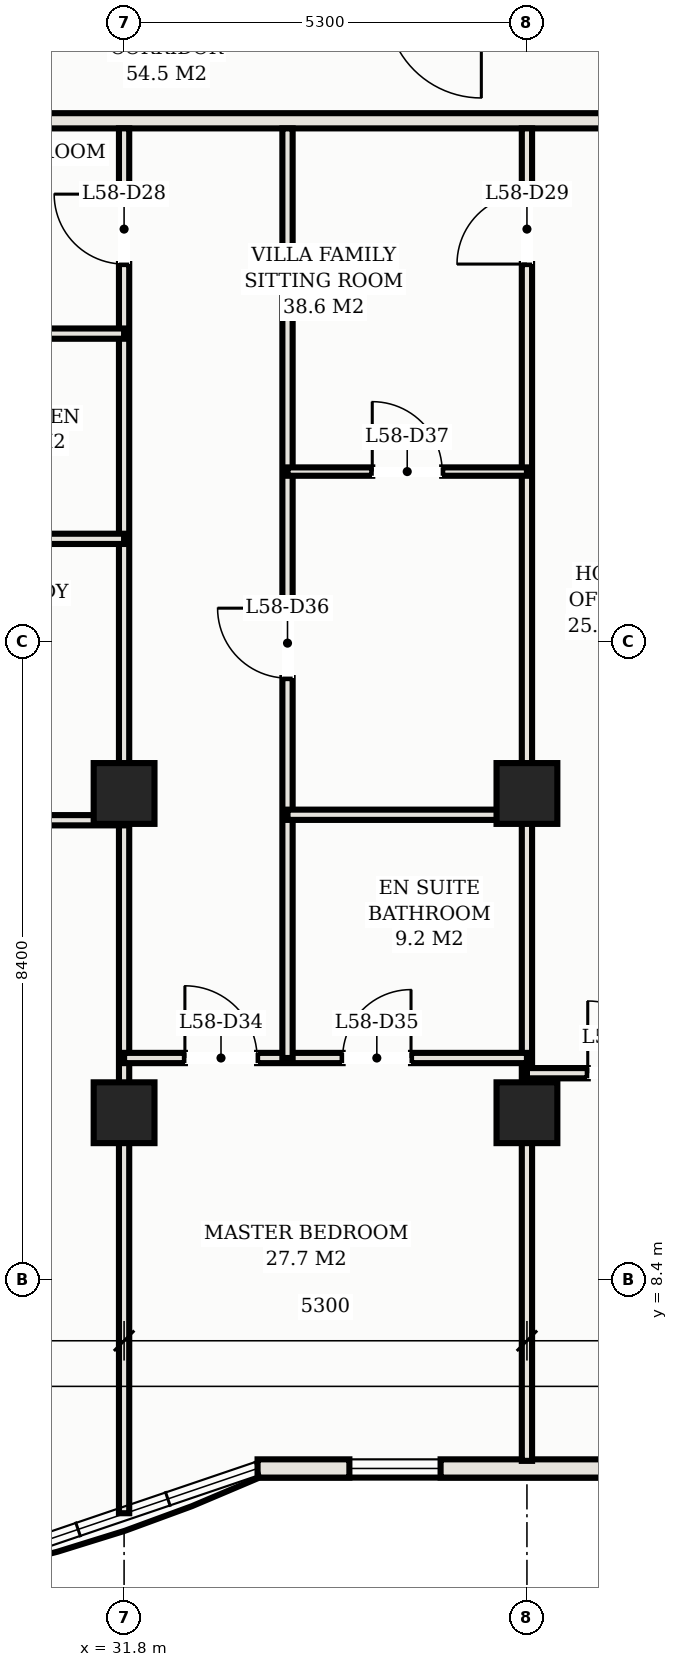
"""IFC4 building model, lengths in metres.
Left out: names, types, materials, properties, quantities, classifications, styles, units other than length and angle.
Written with IfcOpenShell. Run it as: python <this file> out.ifc"""

import sys

from ifc_helpers import new_model, si_unit, direction, frame, frame_2d, origin, origin_2d, place, context, subcontext, project, spatial, rectangle, hollow_rectangle, extrude, element, fill, save


model = new_model("IFC4")
c1 = context("Model", 3, precision=1e-05, world=origin(), true_north=direction((0.0, 1.0)))
c2 = subcontext(c1, "Body", "Model", "MODEL_VIEW")
j1 = project(units=[si_unit("LENGTHUNIT", "METRE"), si_unit("PLANEANGLEUNIT", "RADIAN")], contexts=[c1])
p1 = place(None, origin())
s1 = spatial("IfcSite", under=j1, at=p1, CompositionType="ELEMENT")
p2 = place(p1, origin())
s2 = spatial("IfcBuilding", under=s1, at=p2, CompositionType="ELEMENT")
p3 = place(p2, frame((0.0, 0.0, 213.2)))
s3 = spatial("IfcBuildingStorey", under=s2, at=p3, CompositionType="ELEMENT", Elevation=213.2)
for number, where, z_axis, x_axis in (
    (1, (31.8, 14.8, 0.0), (0.0, 0.0, 1.0), (1.0, 0.0, 0.0)),
    (2, (31.8, 10.6, 0.0), (0.0, 0.0, 1.0), (1.0, 0.0, 0.0)),
    (3, (37.1, 14.8, 0.0), (0.0, 0.0, 1.0), (1.0, 0.0, 0.0)),
    (4, (37.1, 10.6, 0.0), (0.0, 0.0, 1.0), (1.0, 0.0, 0.0)),
):
    element("IfcColumn", number, at=place(p3, frame(where, z_axis=z_axis, x_axis=x_axis)), inside=s3, PredefinedType="COLUMN", context=c2, shape_type="SweptSolid", body=[
        extrude(hollow_rectangle(XDim=0.8, YDim=0.8, WallThickness=0.028, at=origin_2d()), origin(), (0.0, 0.0, 1.0), 3.3),
    ])
p4 = place(p3, frame((33.556, 5.92, 0.0), z_axis=(0.0, 0.0, 1.0), x_axis=(1.0, 0.0, 0.0)))
e5 = element("IfcWall", 5, at=p4, inside=s3, PredefinedType="SOLIDWALL", context=c2, shape_type="SweptSolid", body=[
    extrude(rectangle(XDim=8.124, YDim=0.24, at=frame_2d((4.062, 0.0))), origin(), (0.0, 0.0, 1.0), 3.11),
])
p5 = place(p4, frame((5.348, 0.0, 0.75)))
e6 = element("IfcOpeningElement", 6, at=p5, cuts=e5, PredefinedType="OPENING", context=c2, shape_type="SweptSolid", body=[
    extrude(rectangle(XDim=0.9, YDim=1.2, at=frame_2d((0.45, 0.6))), frame((0.0, 0.13, 0.0), z_axis=(0.0, -1.0, 0.0), x_axis=(1.0, 0.0, 0.0)), (0.0, 0.0, 1.0), 0.26),
])
p6 = place(p4, frame((1.208, 0.0, 0.75)))
e7 = element("IfcOpeningElement", 7, at=p6, cuts=e5, PredefinedType="OPENING", context=c2, shape_type="SweptSolid", body=[
    extrude(rectangle(XDim=1.2, YDim=1.5, at=frame_2d((0.6, 0.75))), frame((0.0, 0.13, 0.0), z_axis=(0.0, -1.0, 0.0), x_axis=(1.0, 0.0, 0.0)), (0.0, 0.0, 1.0), 0.26),
])
p7 = place(p3, frame((6.72, 23.65, 0.0), z_axis=(0.0, 0.0, 1.0), x_axis=(1.0, 0.0, 0.0)))
e8 = element("IfcWall", 8, at=p7, inside=s3, PredefinedType="PARTITIONING", context=c2, shape_type="SweptSolid", body=[
    extrude(rectangle(XDim=39.56, YDim=0.2, at=frame_2d((19.78, 0.0))), origin(), (0.0, 0.0, 1.0), 2.43),
])
p8 = place(p7, frame((4.63, 0.0, 0.0)))
e9 = element("IfcOpeningElement", 9, at=p8, cuts=e8, PredefinedType="OPENING", context=c2, shape_type="SweptSolid", body=[
    extrude(rectangle(XDim=1.1, YDim=2.25, at=frame_2d((0.55, 1.125))), frame((0.0, 0.11, 0.0), z_axis=(0.0, -1.0, 0.0), x_axis=(1.0, 0.0, 0.0)), (0.0, 0.0, 1.0), 0.22),
])
p9 = place(p7, frame((20.53, 0.0, 0.0)))
e10 = element("IfcOpeningElement", 10, at=p9, cuts=e8, PredefinedType="OPENING", context=c2, shape_type="SweptSolid", body=[
    extrude(rectangle(XDim=1.1, YDim=2.25, at=frame_2d((0.55, 1.125))), frame((0.0, 0.11, 0.0), z_axis=(0.0, -1.0, 0.0), x_axis=(1.0, 0.0, 0.0)), (0.0, 0.0, 1.0), 0.22),
])
p10 = place(p7, frame((2.085, 0.0, 0.0)))
e11 = element("IfcOpeningElement", 11, at=p10, cuts=e8, PredefinedType="OPENING", context=c2, shape_type="SweptSolid", body=[
    extrude(rectangle(XDim=0.92, YDim=2.15, at=frame_2d((0.46, 1.075))), frame((0.0, 0.11, 0.0), z_axis=(0.0, -1.0, 0.0), x_axis=(1.0, 0.0, 0.0)), (0.0, 0.0, 1.0), 0.22),
])
p11 = place(p7, frame((36.555, 0.0, 0.0)))
e12 = element("IfcOpeningElement", 12, at=p11, cuts=e8, PredefinedType="OPENING", context=c2, shape_type="SweptSolid", body=[
    extrude(rectangle(XDim=0.92, YDim=2.15, at=frame_2d((0.46, 1.075))), frame((0.0, 0.11, 0.0), z_axis=(0.0, -1.0, 0.0), x_axis=(1.0, 0.0, 0.0)), (0.0, 0.0, 1.0), 0.22),
])
p12 = place(p3, frame((31.8, 5.331, 0.0), z_axis=(0.0, 0.0, 1.0), x_axis=(0.0, 1.0, 0.0)))
e13 = element("IfcWall", 13, at=p12, inside=s3, PredefinedType="PARTITIONING", context=c2, shape_type="SweptSolid", body=[
    extrude(rectangle(XDim=18.219, YDim=0.135, at=frame_2d((9.109, 0.0))), origin(), (0.0, 0.0, 1.0), 2.43),
])
p13 = place(p12, frame((16.434, 0.0, 0.0)))
e14 = element("IfcOpeningElement", 14, at=p13, cuts=e13, PredefinedType="OPENING", context=c2, shape_type="SweptSolid", body=[
    extrude(rectangle(XDim=0.92, YDim=2.15, at=frame_2d((0.46, 1.075))), frame((0.0, 0.078, 0.0), z_axis=(0.0, -1.0, 0.0), x_axis=(1.0, 0.0, 0.0)), (0.0, 0.0, 1.0), 0.155),
])
p14 = place(p3, frame((37.1, 6.02, 0.0), z_axis=(0.0, 0.0, 1.0), x_axis=(0.0, 1.0, 0.0)))
e15 = element("IfcWall", 15, at=p14, inside=s3, PredefinedType="PARTITIONING", context=c2, shape_type="SweptSolid", body=[
    extrude(rectangle(XDim=17.53, YDim=0.135, at=frame_2d((8.765, 0.0))), origin(), (0.0, 0.0, 1.0), 2.43),
])
p15 = place(p14, frame((15.745, 0.0, 0.0)))
e16 = element("IfcOpeningElement", 16, at=p15, cuts=e15, PredefinedType="OPENING", context=c2, shape_type="SweptSolid", body=[
    extrude(rectangle(XDim=0.92, YDim=2.15, at=frame_2d((0.46, 1.075))), frame((0.0, 0.078, 0.0), z_axis=(0.0, -1.0, 0.0), x_axis=(1.0, 0.0, 0.0)), (0.0, 0.0, 1.0), 0.155),
])
p16 = place(p3, frame((26.5, 14.448, 0.0), z_axis=(0.0, 0.0, 1.0), x_axis=(1.0, 0.0, 0.0)))
e17 = element("IfcWall", 17, at=p16, inside=s3, PredefinedType="PARTITIONING", context=c2, shape_type="SweptSolid", body=[
    extrude(rectangle(XDim=5.3, YDim=0.135, at=frame_2d((2.65, 0.0))), origin(), (0.0, 0.0, 1.0), 2.43),
])
p17 = place(p16, frame((0.815, 0.0, 0.0)))
e18 = element("IfcOpeningElement", 18, at=p17, cuts=e17, PredefinedType="OPENING", context=c2, shape_type="SweptSolid", body=[
    extrude(rectangle(XDim=0.92, YDim=2.15, at=frame_2d((0.46, 1.075))), frame((0.0, 0.078, 0.0), z_axis=(0.0, -1.0, 0.0), x_axis=(1.0, 0.0, 0.0)), (0.0, 0.0, 1.0), 0.155),
])
for number, where, z_axis, x_axis in (
    (19, (28.65, 18.15, 0.0), (0.0, 0.0, 1.0), (1.0, 0.0, 0.0)),
    (20, (28.65, 20.85, 0.0), (0.0, 0.0, 1.0), (1.0, 0.0, 0.0)),
):
    element("IfcWall", number, at=place(p3, frame(where, z_axis=z_axis, x_axis=x_axis)), inside=s3, PredefinedType="PARTITIONING", context=c2, shape_type="SweptSolid", body=[
        extrude(rectangle(XDim=3.15, YDim=0.135, at=frame_2d((1.575, 0.0))), origin(), (0.0, 0.0, 1.0), 2.43),
    ])
p18 = place(p3, frame((31.8, 11.32, 0.0), z_axis=(0.0, 0.0, 1.0), x_axis=(1.0, 0.0, 0.0)))
e21 = element("IfcWall", 21, at=p18, inside=s3, PredefinedType="PARTITIONING", context=c2, shape_type="SweptSolid", body=[
    extrude(rectangle(XDim=5.3, YDim=0.135, at=frame_2d((2.65, 0.0))), origin(), (0.0, 0.0, 1.0), 2.43),
])
p19 = place(p18, frame((0.8, 0.0, 0.0)))
e22 = element("IfcOpeningElement", 22, at=p19, cuts=e21, PredefinedType="OPENING", context=c2, shape_type="SweptSolid", body=[
    extrude(rectangle(XDim=0.95, YDim=2.15, at=frame_2d((0.475, 1.075))), frame((0.0, 0.078, 0.0), z_axis=(0.0, -1.0, 0.0), x_axis=(1.0, 0.0, 0.0)), (0.0, 0.0, 1.0), 0.155),
])
p20 = place(p18, frame((2.875, 0.0, 0.0)))
e23 = element("IfcOpeningElement", 23, at=p20, cuts=e21, PredefinedType="OPENING", context=c2, shape_type="SweptSolid", body=[
    extrude(rectangle(XDim=0.9, YDim=2.15, at=frame_2d((0.45, 1.075))), frame((0.0, 0.078, 0.0), z_axis=(0.0, -1.0, 0.0), x_axis=(1.0, 0.0, 0.0)), (0.0, 0.0, 1.0), 0.155),
])
p21 = place(p3, frame((33.95, 11.32, 0.0), z_axis=(0.0, 0.0, 1.0), x_axis=(0.0, 1.0, 0.0)))
e24 = element("IfcWall", 24, at=p21, inside=s3, PredefinedType="PARTITIONING", context=c2, shape_type="SweptSolid", body=[
    extrude(rectangle(XDim=12.23, YDim=0.135, at=frame_2d((6.115, 0.0))), origin(), (0.0, 0.0, 1.0), 2.43),
])
p22 = place(p21, frame((4.998, 0.0, 0.0)))
e25 = element("IfcOpeningElement", 25, at=p22, cuts=e24, PredefinedType="OPENING", context=c2, shape_type="SweptSolid", body=[
    extrude(rectangle(XDim=0.92, YDim=2.15, at=frame_2d((0.46, 1.075))), frame((0.0, 0.078, 0.0), z_axis=(0.0, -1.0, 0.0), x_axis=(1.0, 0.0, 0.0)), (0.0, 0.0, 1.0), 0.155),
])
p23 = place(p3, frame((33.95, 14.52, 0.0), z_axis=(0.0, 0.0, 1.0), x_axis=(1.0, 0.0, 0.0)))
e26 = element("IfcWall", 26, at=p23, inside=s3, PredefinedType="PARTITIONING", context=c2, shape_type="SweptSolid", body=[
    extrude(rectangle(XDim=3.15, YDim=0.135, at=frame_2d((1.575, 0.0))), origin(), (0.0, 0.0, 1.0), 2.43),
])
p24 = place(p3, frame((33.95, 19.035, 0.0), z_axis=(0.0, 0.0, 1.0), x_axis=(1.0, 0.0, 0.0)))
e27 = element("IfcWall", 27, at=p24, inside=s3, PredefinedType="MOVABLE", context=c2, shape_type="SweptSolid", body=[
    extrude(rectangle(XDim=3.15, YDim=0.11, at=frame_2d((1.575, 0.0))), origin(), (0.0, 0.0, 1.0), 2.43),
])
p25 = place(p24, frame((1.115, 0.0, 0.0)))
e28 = element("IfcOpeningElement", 28, at=p25, cuts=e27, PredefinedType="OPENING", context=c2, shape_type="SweptSolid", body=[
    extrude(rectangle(XDim=0.92, YDim=2.15, at=frame_2d((0.46, 1.075))), frame((0.0, 0.065, 0.0), z_axis=(0.0, -1.0, 0.0), x_axis=(1.0, 0.0, 0.0)), (0.0, 0.0, 1.0), 0.13),
])
p26 = place(p3, frame((37.1, 11.12, 0.0), z_axis=(0.0, 0.0, 1.0), x_axis=(1.0, 0.0, 0.0)))
e29 = element("IfcWall", 29, at=p26, inside=s3, PredefinedType="PARTITIONING", context=c2, shape_type="SweptSolid", body=[
    extrude(rectangle(XDim=5.3, YDim=0.135, at=frame_2d((2.65, 0.0))), origin(), (0.0, 0.0, 1.0), 2.43),
])
p27 = place(p26, frame((0.8, 0.0, 0.0)))
e30 = element("IfcOpeningElement", 30, at=p27, cuts=e29, PredefinedType="OPENING", context=c2, shape_type="SweptSolid", body=[
    extrude(rectangle(XDim=0.95, YDim=2.15, at=frame_2d((0.475, 1.075))), frame((0.0, 0.078, 0.0), z_axis=(0.0, -1.0, 0.0), x_axis=(1.0, 0.0, 0.0)), (0.0, 0.0, 1.0), 0.155),
])
p28 = place(p13, origin())
e31 = element("IfcDoor", 31, at=p28, inside=s3, OperationType="SINGLE_SWING_RIGHT", PredefinedType="DOOR", context=c2, shape_type="SweptSolid", body=[
    extrude(rectangle(XDim=0.92, YDim=2.15, at=frame_2d((0.46, 1.075))), frame((0.0, 0.025, 0.0), z_axis=(0.0, -1.0, 0.0), x_axis=(1.0, 0.0, 0.0)), (0.0, 0.0, 1.0), 0.05),
])
fill(e14, e31)
p29 = place(p15, origin())
e32 = element("IfcDoor", 32, at=p29, inside=s3, OperationType="SINGLE_SWING_LEFT", PredefinedType="DOOR", context=c2, shape_type="SweptSolid", body=[
    extrude(rectangle(XDim=0.92, YDim=2.15, at=frame_2d((0.46, 1.075))), frame((0.0, 0.025, 0.0), z_axis=(0.0, -1.0, 0.0), x_axis=(1.0, 0.0, 0.0)), (0.0, 0.0, 1.0), 0.05),
])
fill(e16, e32)
p30 = place(p19, origin())
e33 = element("IfcDoor", 33, at=p30, inside=s3, OperationType="SINGLE_SWING_LEFT", PredefinedType="DOOR", context=c2, shape_type="SweptSolid", body=[
    extrude(rectangle(XDim=0.95, YDim=2.15, at=frame_2d((0.475, 1.075))), frame((0.0, 0.025, 0.0), z_axis=(0.0, -1.0, 0.0), x_axis=(1.0, 0.0, 0.0)), (0.0, 0.0, 1.0), 0.05),
])
fill(e22, e33)
p31 = place(p20, origin())
e34 = element("IfcDoor", 34, at=p31, inside=s3, OperationType="SINGLE_SWING_RIGHT", PredefinedType="DOOR", context=c2, shape_type="SweptSolid", body=[
    extrude(rectangle(XDim=0.9, YDim=2.15, at=frame_2d((0.45, 1.075))), frame((0.0, 0.025, 0.0), z_axis=(0.0, -1.0, 0.0), x_axis=(1.0, 0.0, 0.0)), (0.0, 0.0, 1.0), 0.05),
])
fill(e23, e34)
p32 = place(p22, origin())
e35 = element("IfcDoor", 35, at=p32, inside=s3, OperationType="SINGLE_SWING_RIGHT", PredefinedType="DOOR", context=c2, shape_type="SweptSolid", body=[
    extrude(rectangle(XDim=0.92, YDim=2.15, at=frame_2d((0.46, 1.075))), frame((0.0, 0.025, 0.0), z_axis=(0.0, -1.0, 0.0), x_axis=(1.0, 0.0, 0.0)), (0.0, 0.0, 1.0), 0.05),
])
fill(e25, e35)
p33 = place(p25, origin())
e36 = element("IfcDoor", 36, at=p33, inside=s3, OperationType="SINGLE_SWING_LEFT", PredefinedType="DOOR", context=c2, shape_type="SweptSolid", body=[
    extrude(rectangle(XDim=0.92, YDim=2.15, at=frame_2d((0.46, 1.075))), frame((0.0, 0.025, 0.0), z_axis=(0.0, -1.0, 0.0), x_axis=(1.0, 0.0, 0.0)), (0.0, 0.0, 1.0), 0.05),
])
fill(e28, e36)
p34 = place(p27, origin())
e37 = element("IfcDoor", 37, at=p34, inside=s3, OperationType="SINGLE_SWING_LEFT", PredefinedType="DOOR", context=c2, shape_type="SweptSolid", body=[
    extrude(rectangle(XDim=0.95, YDim=2.15, at=frame_2d((0.475, 1.075))), frame((0.0, 0.025, 0.0), z_axis=(0.0, -1.0, 0.0), x_axis=(1.0, 0.0, 0.0)), (0.0, 0.0, 1.0), 0.05),
])
fill(e30, e37)
p35 = place(p6, origin())
e38 = element("IfcWindow", 38, at=p35, inside=s3, PartitioningType="SINGLE_PANEL", PredefinedType="WINDOW", context=c2, shape_type="SweptSolid", body=[
    extrude(rectangle(XDim=1.2, YDim=1.5, at=frame_2d((0.6, 0.75))), frame((0.0, 0.03, 0.0), z_axis=(0.0, -1.0, 0.0), x_axis=(1.0, 0.0, 0.0)), (0.0, 0.0, 1.0), 0.06),
])
fill(e7, e38)
save(model, sys.argv[1])
